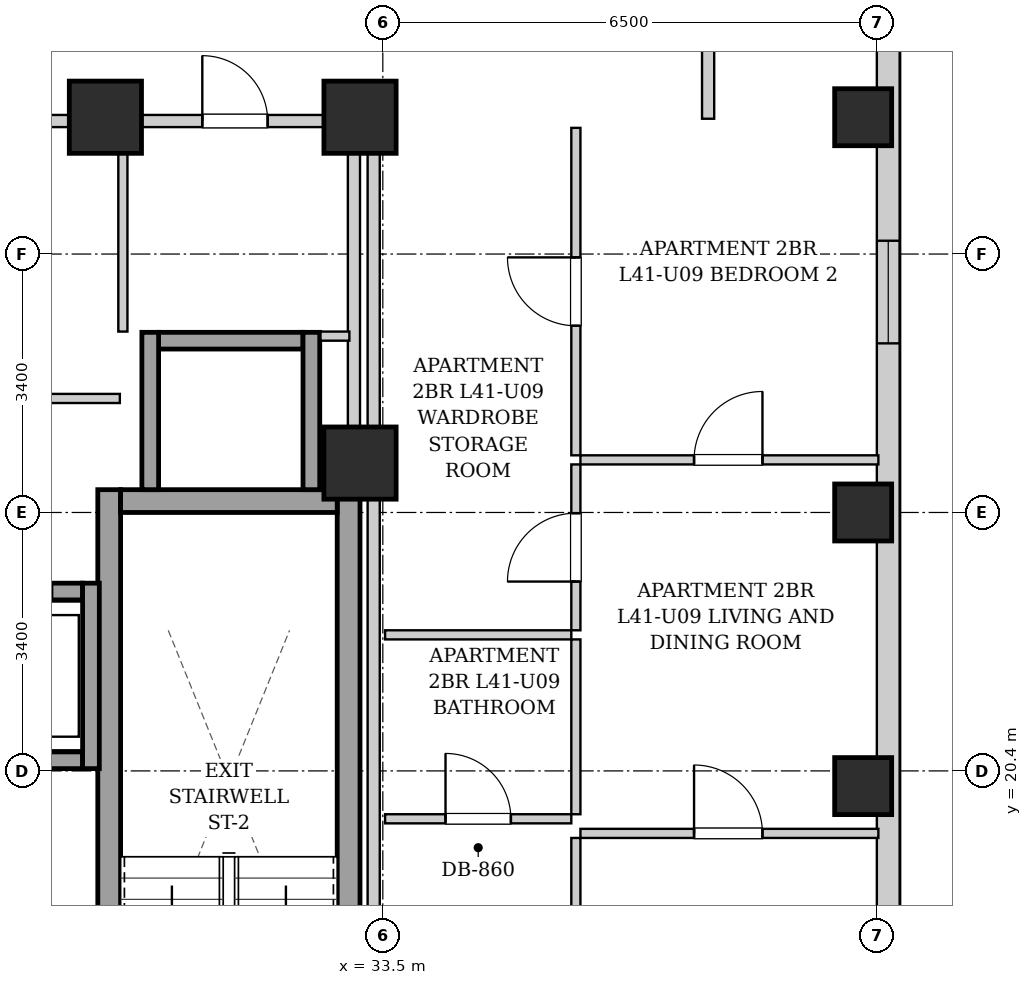
"""IFC4 building model, lengths in metres.
Left out: names, types, materials, properties, quantities, classifications, styles, units other than length and angle.
Written with IfcOpenShell. Run it as: python <this file> out.ifc"""

import sys

from ifc_helpers import new_model, si_unit, direction, frame, frame_2d, origin, origin_2d, place, context, subcontext, project, spatial, rectangle, extrude, element, fill, save


model = new_model("IFC4")
c1 = context("Model", 3, precision=1e-05, world=origin(), true_north=direction((0.0, 1.0)))
c2 = subcontext(c1, "Body", "Model", "MODEL_VIEW")
j1 = project(units=[si_unit("LENGTHUNIT", "METRE"), si_unit("PLANEANGLEUNIT", "RADIAN")], contexts=[c1])
p1 = place(None, origin())
s1 = spatial("IfcSite", under=j1, at=p1, CompositionType="ELEMENT")
p2 = place(p1, origin())
s2 = spatial("IfcBuilding", under=s1, at=p2, CompositionType="ELEMENT")
p3 = place(p2, frame((0.0, 0.0, 143.9)))
s3 = spatial("IfcBuildingStorey", under=s2, at=p3, CompositionType="ELEMENT", Elevation=143.9)
for number, where, z_axis, x_axis in (
    (1, (39.82, 20.2, 0.0), (0.0, 0.0, 1.0), (1.0, 0.0, 0.0)),
    (2, (39.82, 23.8, 0.0), (0.0, 0.0, 1.0), (1.0, 0.0, 0.0)),
    (3, (39.82, 29.0, 0.0), (0.0, 0.0, 1.0), (1.0, 0.0, 0.0)),
):
    element("IfcColumn", number, at=place(p3, frame(where, z_axis=z_axis, x_axis=x_axis)), inside=s3, PredefinedType="COLUMN", context=c2, shape_type="SweptSolid", body=[
        extrude(rectangle(XDim=0.75, YDim=0.75, at=origin_2d()), origin(), (0.0, 0.0, 1.0), 3.25),
    ])
for number, where, z_axis, x_axis in (
    (4, (29.85, 29.0, 0.0), (0.0, 0.0, 1.0), (1.0, 0.0, 0.0)),
    (5, (33.2, 29.0, 0.0), (0.0, 0.0, 1.0), (1.0, 0.0, 0.0)),
    (6, (33.2, 24.45, 0.0), (0.0, 0.0, 1.0), (1.0, 0.0, 0.0)),
):
    element("IfcColumn", number, at=place(p3, frame(where, z_axis=z_axis, x_axis=x_axis)), inside=s3, PredefinedType="COLUMN", context=c2, shape_type="SweptSolid", body=[
        extrude(rectangle(XDim=0.95, YDim=0.95, at=origin_2d()), origin(), (0.0, 0.0, 1.0), 3.25),
    ])
p4 = place(p3, frame((40.15, 40.8, 0.0), z_axis=(0.0, 0.0, 1.0), x_axis=(0.0, -1.0, 0.0)))
e7 = element("IfcWall", 7, at=p4, inside=s3, PredefinedType="SOLIDWALL", context=c2, shape_type="SweptSolid", body=[
    extrude(rectangle(XDim=34.5, YDim=0.3, at=frame_2d((17.25, 0.0))), origin(), (0.0, 0.0, 1.0), 2.99),
])
p5 = place(p4, frame((31.575, 0.0, 0.55)))
e8 = element("IfcOpeningElement", 8, at=p5, cuts=e7, PredefinedType="OPENING", context=c2, shape_type="SweptSolid", body=[
    extrude(rectangle(XDim=1.35, YDim=1.2, at=frame_2d((0.675, 0.6))), frame((0.0, 0.16, 0.0), z_axis=(0.0, -1.0, 0.0), x_axis=(1.0, 0.0, 0.0)), (0.0, 0.0, 1.0), 0.32),
])
p6 = place(p4, frame((3.075, 0.0, 0.55)))
e9 = element("IfcOpeningElement", 9, at=p6, cuts=e7, PredefinedType="OPENING", context=c2, shape_type="SweptSolid", body=[
    extrude(rectangle(XDim=1.35, YDim=1.2, at=frame_2d((0.675, 0.6))), frame((0.0, 0.16, 0.0), z_axis=(0.0, -1.0, 0.0), x_axis=(1.0, 0.0, 0.0)), (0.0, 0.0, 1.0), 0.32),
])
p7 = place(p4, frame((1.085, 0.0, 0.55)))
e10 = element("IfcOpeningElement", 10, at=p7, cuts=e7, PredefinedType="OPENING", context=c2, shape_type="SweptSolid", body=[
    extrude(rectangle(XDim=1.35, YDim=1.2, at=frame_2d((0.675, 0.6))), frame((0.0, 0.16, 0.0), z_axis=(0.0, -1.0, 0.0), x_axis=(1.0, 0.0, 0.0)), (0.0, 0.0, 1.0), 0.32),
])
p8 = place(p4, frame((22.8, 0.0, 0.55)))
e11 = element("IfcOpeningElement", 11, at=p8, cuts=e7, PredefinedType="OPENING", context=c2, shape_type="SweptSolid", body=[
    extrude(rectangle(XDim=1.35, YDim=1.2, at=frame_2d((0.675, 0.6))), frame((0.0, 0.16, 0.0), z_axis=(0.0, -1.0, 0.0), x_axis=(1.0, 0.0, 0.0)), (0.0, 0.0, 1.0), 0.32),
])
p9 = place(p4, frame((13.425, 0.0, 0.55)))
e12 = element("IfcOpeningElement", 12, at=p9, cuts=e7, PredefinedType="OPENING", context=c2, shape_type="SweptSolid", body=[
    extrude(rectangle(XDim=1.35, YDim=1.2, at=frame_2d((0.675, 0.6))), frame((0.0, 0.16, 0.0), z_axis=(0.0, -1.0, 0.0), x_axis=(1.0, 0.0, 0.0)), (0.0, 0.0, 1.0), 0.32),
])
for number, where, z_axis, x_axis in (
    (13, (29.9, 15.1, 0.0), (0.0, 0.0, 1.0), (0.0, 1.0, 0.0)),
    (14, (33.05, 15.1, 0.0), (0.0, 0.0, 1.0), (0.0, 1.0, 0.0)),
):
    element("IfcWall", number, at=place(p3, frame(where, z_axis=z_axis, x_axis=x_axis)), inside=s3, PredefinedType="SHEAR", context=c2, shape_type="SweptSolid", body=[
        extrude(rectangle(XDim=9.0, YDim=0.3, at=frame_2d((4.5, 0.0))), origin(), (0.0, 0.0, 1.0), 2.99),
    ])
p10 = place(p3, frame((30.05, 23.95, 0.0), z_axis=(0.0, 0.0, 1.0), x_axis=(1.0, 0.0, 0.0)))
e15 = element("IfcWall", 15, at=p10, inside=s3, PredefinedType="SHEAR", context=c2, shape_type="SweptSolid", body=[
    extrude(rectangle(XDim=2.85, YDim=0.3, at=frame_2d((1.425, 0.0))), origin(), (0.0, 0.0, 1.0), 2.99),
])
p11 = place(p3, frame((27.65, 20.54, 0.0), z_axis=(0.0, 0.0, 1.0), x_axis=(1.0, 0.0, 0.0)))
e16 = element("IfcWall", 16, at=p11, inside=s3, PredefinedType="SHEAR", context=c2, shape_type="SweptSolid", body=[
    extrude(rectangle(XDim=1.9, YDim=0.22, at=frame_2d((0.95, 0.0))), origin(), (0.0, 0.0, 1.0), 2.99),
])
p12 = place(p3, frame((27.65, 22.76, 0.0), z_axis=(0.0, 0.0, 1.0), x_axis=(1.0, 0.0, 0.0)))
e17 = element("IfcWall", 17, at=p12, inside=s3, PredefinedType="SHEAR", context=c2, shape_type="SweptSolid", body=[
    extrude(rectangle(XDim=1.9, YDim=0.22, at=frame_2d((0.95, 0.0))), origin(), (0.0, 0.0, 1.0), 2.99),
])
p13 = place(p12, frame((0.4, 0.0, 0.0)))
e18 = element("IfcOpeningElement", 18, at=p13, cuts=e17, PredefinedType="OPENING", context=c2, shape_type="SweptSolid", body=[
    extrude(rectangle(XDim=1.1, YDim=2.15, at=frame_2d((0.55, 1.075))), frame((0.0, 0.12, 0.0), z_axis=(0.0, -1.0, 0.0), x_axis=(1.0, 0.0, 0.0)), (0.0, 0.0, 1.0), 0.24),
])
p14 = place(p3, frame((29.66, 20.43, 0.0), z_axis=(0.0, 0.0, 1.0), x_axis=(0.0, 1.0, 0.0)))
e19 = element("IfcWall", 19, at=p14, inside=s3, PredefinedType="SHEAR", context=c2, shape_type="SweptSolid", body=[
    extrude(rectangle(XDim=2.44, YDim=0.22, at=frame_2d((1.22, 0.0))), origin(), (0.0, 0.0, 1.0), 2.99),
])
p15 = place(p3, frame((30.55, 26.06, 0.0), z_axis=(0.0, 0.0, 1.0), x_axis=(1.0, 0.0, 0.0)))
e20 = element("IfcWall", 20, at=p15, inside=s3, PredefinedType="SHEAR", context=c2, shape_type="SweptSolid", body=[
    extrude(rectangle(XDim=1.9, YDim=0.22, at=frame_2d((0.95, 0.0))), origin(), (0.0, 0.0, 1.0), 2.99),
])
for number, where, z_axis, x_axis in (
    (21, (30.44, 24.1, 0.0), (0.0, 0.0, 1.0), (0.0, 1.0, 0.0)),
    (22, (32.56, 24.1, 0.0), (0.0, 0.0, 1.0), (0.0, 1.0, 0.0)),
):
    element("IfcWall", number, at=place(p3, frame(where, z_axis=z_axis, x_axis=x_axis)), inside=s3, PredefinedType="SHEAR", context=c2, shape_type="SweptSolid", body=[
        extrude(rectangle(XDim=2.07, YDim=0.22, at=frame_2d((1.035, 0.0))), origin(), (0.0, 0.0, 1.0), 2.99),
    ])
p16 = place(p3, frame((33.12, 24.12, 0.0), z_axis=(0.0, 0.0, 1.0), x_axis=(0.0, 1.0, 0.0)))
e23 = element("IfcWall", 23, at=p16, inside=s3, PredefinedType="PARTITIONING", context=c2, shape_type="SweptSolid", body=[
    extrude(rectangle(XDim=4.76, YDim=0.16, at=frame_2d((2.38, 0.0))), origin(), (0.0, 0.0, 1.0), 2.99),
])
p17 = place(p3, frame((30.08, 26.18, 0.0), z_axis=(0.0, 0.0, 1.0), x_axis=(0.0, 1.0, 0.0)))
e24 = element("IfcWall", 24, at=p17, inside=s3, PredefinedType="PARTITIONING", context=c2, shape_type="SweptSolid", body=[
    extrude(rectangle(XDim=2.68, YDim=0.12, at=frame_2d((1.34, 0.0))), origin(), (0.0, 0.0, 1.0), 2.99),
])
p18 = place(p3, frame((32.68, 26.12, 0.0), z_axis=(0.0, 0.0, 1.0), x_axis=(1.0, 0.0, 0.0)))
e25 = element("IfcWall", 25, at=p18, inside=s3, PredefinedType="PARTITIONING", context=c2, shape_type="SweptSolid", body=[
    extrude(rectangle(XDim=0.38, YDim=0.12, at=frame_2d((0.19, 0.0))), origin(), (0.0, 0.0, 1.0), 2.99),
])
p19 = place(p3, frame((30.08, 28.95, 0.0), z_axis=(0.0, 0.0, 1.0), x_axis=(1.0, 0.0, 0.0)))
e26 = element("IfcWall", 26, at=p19, inside=s3, PredefinedType="PARTITIONING", context=c2, shape_type="SweptSolid", body=[
    extrude(rectangle(XDim=2.96, YDim=0.16, at=frame_2d((1.48, 0.0))), origin(), (0.0, 0.0, 1.0), 2.99),
])
p20 = place(p19, frame((1.045, 0.0, 0.0)))
e27 = element("IfcOpeningElement", 27, at=p20, cuts=e26, PredefinedType="OPENING", context=c2, shape_type="SweptSolid", body=[
    extrude(rectangle(XDim=0.86, YDim=2.05, at=frame_2d((0.43, 1.025))), frame((0.0, 0.09, 0.0), z_axis=(0.0, -1.0, 0.0), x_axis=(1.0, 0.0, 0.0)), (0.0, 0.0, 1.0), 0.18),
])
p21 = place(p3, frame((25.72, 28.95, 0.0), z_axis=(0.0, 0.0, 1.0), x_axis=(1.0, 0.0, 0.0)))
e28 = element("IfcWall", 28, at=p21, inside=s3, PredefinedType="PARTITIONING", context=c2, shape_type="SweptSolid", body=[
    extrude(rectangle(XDim=4.32, YDim=0.16, at=frame_2d((2.16, 0.0))), origin(), (0.0, 0.0, 1.0), 2.426),
])
p22 = place(p3, frame((25.72, 25.3, 0.0), z_axis=(0.0, 0.0, 1.0), x_axis=(1.0, 0.0, 0.0)))
e29 = element("IfcWall", 29, at=p22, inside=s3, PredefinedType="PARTITIONING", context=c2, shape_type="SweptSolid", body=[
    extrude(rectangle(XDim=4.32, YDim=0.12, at=frame_2d((2.16, 0.0))), origin(), (0.0, 0.0, 1.0), 2.99),
])
p23 = place(p22, frame((1.65, 0.0, 0.0)))
e30 = element("IfcOpeningElement", 30, at=p23, cuts=e29, PredefinedType="OPENING", context=c2, shape_type="SweptSolid", body=[
    extrude(rectangle(XDim=0.9, YDim=2.05, at=frame_2d((0.45, 1.025))), frame((0.0, 0.07, 0.0), z_axis=(0.0, -1.0, 0.0), x_axis=(1.0, 0.0, 0.0)), (0.0, 0.0, 1.0), 0.14),
])
p24 = place(p3, frame((37.78, 28.98, 0.0), z_axis=(0.0, 0.0, 1.0), x_axis=(0.0, 1.0, 0.0)))
e31 = element("IfcWall", 31, at=p24, inside=s3, PredefinedType="PARTITIONING", context=c2, shape_type="SweptSolid", body=[
    extrude(rectangle(XDim=1.74, YDim=0.16, at=frame_2d((0.87, 0.0))), origin(), (0.0, 0.0, 1.0), 2.99),
])
p25 = place(p3, frame((33.53, 22.19, 0.0), z_axis=(0.0, 0.0, 1.0), x_axis=(1.0, 0.0, 0.0)))
e32 = element("IfcWall", 32, at=p25, inside=s3, PredefinedType="PARTITIONING", context=c2, shape_type="SweptSolid", body=[
    extrude(rectangle(XDim=2.45, YDim=0.12, at=frame_2d((1.225, 0.0))), origin(), (0.0, 0.0, 1.0), 2.99),
])
p26 = place(p3, frame((36.04, 22.25, 0.0), z_axis=(0.0, 0.0, 1.0), x_axis=(0.0, 1.0, 0.0)))
e33 = element("IfcWall", 33, at=p26, inside=s3, PredefinedType="PARTITIONING", context=c2, shape_type="SweptSolid", body=[
    extrude(rectangle(XDim=2.182, YDim=0.12, at=frame_2d((1.091, 0.0))), origin(), (0.0, 0.0, 1.0), 2.99),
])
p27 = place(p26, frame((0.641, 0.0, 0.0)))
e34 = element("IfcOpeningElement", 34, at=p27, cuts=e33, PredefinedType="OPENING", context=c2, shape_type="SweptSolid", body=[
    extrude(rectangle(XDim=0.9, YDim=2.05, at=frame_2d((0.45, 1.025))), frame((0.0, 0.07, 0.0), z_axis=(0.0, -1.0, 0.0), x_axis=(1.0, 0.0, 0.0)), (0.0, 0.0, 1.0), 0.14),
])
p28 = place(p3, frame((36.04, 24.552, 0.0), z_axis=(0.0, 0.0, 1.0), x_axis=(0.0, 1.0, 0.0)))
e35 = element("IfcWall", 35, at=p28, inside=s3, PredefinedType="PARTITIONING", context=c2, shape_type="SweptSolid", body=[
    extrude(rectangle(XDim=4.308, YDim=0.12, at=frame_2d((2.154, 0.0))), origin(), (0.0, 0.0, 1.0), 2.99),
])
p29 = place(p28, frame((1.704, 0.0, 0.0)))
e36 = element("IfcOpeningElement", 36, at=p29, cuts=e35, PredefinedType="OPENING", context=c2, shape_type="SweptSolid", body=[
    extrude(rectangle(XDim=0.9, YDim=2.05, at=frame_2d((0.45, 1.025))), frame((0.0, 0.07, 0.0), z_axis=(0.0, -1.0, 0.0), x_axis=(1.0, 0.0, 0.0)), (0.0, 0.0, 1.0), 0.14),
])
p30 = place(p3, frame((33.53, 19.77, 0.0), z_axis=(0.0, 0.0, 1.0), x_axis=(1.0, 0.0, 0.0)))
e37 = element("IfcWall", 37, at=p30, inside=s3, PredefinedType="PARTITIONING", context=c2, shape_type="SweptSolid", body=[
    extrude(rectangle(XDim=2.45, YDim=0.12, at=frame_2d((1.225, 0.0))), origin(), (0.0, 0.0, 1.0), 2.99),
])
p31 = place(p30, frame((0.795, 0.0, 0.0)))
e38 = element("IfcOpeningElement", 38, at=p31, cuts=e37, PredefinedType="OPENING", context=c2, shape_type="SweptSolid", body=[
    extrude(rectangle(XDim=0.86, YDim=2.05, at=frame_2d((0.43, 1.025))), frame((0.0, 0.07, 0.0), z_axis=(0.0, -1.0, 0.0), x_axis=(1.0, 0.0, 0.0)), (0.0, 0.0, 1.0), 0.14),
])
p32 = place(p3, frame((36.04, 19.83, 0.0), z_axis=(0.0, 0.0, 1.0), x_axis=(0.0, 1.0, 0.0)))
e39 = element("IfcWall", 39, at=p32, inside=s3, PredefinedType="PARTITIONING", context=c2, shape_type="SweptSolid", body=[
    extrude(rectangle(XDim=2.3, YDim=0.12, at=frame_2d((1.15, 0.0))), origin(), (0.0, 0.0, 1.0), 2.99),
])
p33 = place(p3, frame((36.04, 15.21, 0.0), z_axis=(0.0, 0.0, 1.0), x_axis=(0.0, 1.0, 0.0)))
e40 = element("IfcWall", 40, at=p33, inside=s3, PredefinedType="PARTITIONING", context=c2, shape_type="SweptSolid", body=[
    extrude(rectangle(XDim=4.308, YDim=0.12, at=frame_2d((2.154, 0.0))), origin(), (0.0, 0.0, 1.0), 2.99),
])
p34 = place(p33, frame((1.704, 0.0, 0.0)))
e41 = element("IfcOpeningElement", 41, at=p34, cuts=e40, PredefinedType="OPENING", context=c2, shape_type="SweptSolid", body=[
    extrude(rectangle(XDim=0.9, YDim=2.05, at=frame_2d((0.45, 1.025))), frame((0.0, 0.07, 0.0), z_axis=(0.0, -1.0, 0.0), x_axis=(1.0, 0.0, 0.0)), (0.0, 0.0, 1.0), 0.14),
])
p35 = place(p3, frame((36.1, 19.578, 0.0), z_axis=(0.0, 0.0, 1.0), x_axis=(1.0, 0.0, 0.0)))
e42 = element("IfcWall", 42, at=p35, inside=s3, PredefinedType="PARTITIONING", context=c2, shape_type="SweptSolid", body=[
    extrude(rectangle(XDim=3.92, YDim=0.12, at=frame_2d((1.96, 0.0))), origin(), (0.0, 0.0, 1.0), 2.99),
])
p36 = place(p35, frame((1.495, 0.0, 0.0)))
e43 = element("IfcOpeningElement", 43, at=p36, cuts=e42, PredefinedType="OPENING", context=c2, shape_type="SweptSolid", body=[
    extrude(rectangle(XDim=0.9, YDim=2.05, at=frame_2d((0.45, 1.025))), frame((0.0, 0.07, 0.0), z_axis=(0.0, -1.0, 0.0), x_axis=(1.0, 0.0, 0.0)), (0.0, 0.0, 1.0), 0.14),
])
p37 = place(p3, frame((36.1, 24.492, 0.0), z_axis=(0.0, 0.0, 1.0), x_axis=(1.0, 0.0, 0.0)))
e44 = element("IfcWall", 44, at=p37, inside=s3, PredefinedType="PARTITIONING", context=c2, shape_type="SweptSolid", body=[
    extrude(rectangle(XDim=3.92, YDim=0.12, at=frame_2d((1.96, 0.0))), origin(), (0.0, 0.0, 1.0), 2.621),
])
p38 = place(p37, frame((1.495, 0.0, 0.0)))
e45 = element("IfcOpeningElement", 45, at=p38, cuts=e44, PredefinedType="OPENING", context=c2, shape_type="SweptSolid", body=[
    extrude(rectangle(XDim=0.9, YDim=2.05, at=frame_2d((0.45, 1.025))), frame((0.0, 0.07, 0.0), z_axis=(0.0, -1.0, 0.0), x_axis=(1.0, 0.0, 0.0)), (0.0, 0.0, 1.0), 0.14),
])
p39 = place(p3, frame((33.38, 15.02, 0.0), z_axis=(0.0, 0.0, 1.0), x_axis=(0.0, 1.0, 0.0)))
e46 = element("IfcWall", 46, at=p39, inside=s3, PredefinedType="PARTITIONING", context=c2, shape_type="SweptSolid", body=[
    extrude(rectangle(XDim=13.98, YDim=0.16, at=frame_2d((6.99, 0.0))), origin(), (0.0, 0.0, 1.0), 2.99),
])
p40 = place(p20, origin())
e47 = element("IfcDoor", 47, at=p40, inside=s3, OperationType="SINGLE_SWING_LEFT", PredefinedType="DOOR", context=c2, shape_type="SweptSolid", body=[
    extrude(rectangle(XDim=0.86, YDim=2.05, at=frame_2d((0.43, 1.025))), frame((0.0, 0.025, 0.0), z_axis=(0.0, -1.0, 0.0), x_axis=(1.0, 0.0, 0.0)), (0.0, 0.0, 1.0), 0.05),
])
fill(e27, e47)
p41 = place(p27, origin())
e48 = element("IfcDoor", 48, at=p41, inside=s3, OperationType="SINGLE_SWING_LEFT", PredefinedType="DOOR", context=c2, shape_type="SweptSolid", body=[
    extrude(rectangle(XDim=0.9, YDim=2.05, at=frame_2d((0.45, 1.025))), frame((0.0, 0.025, 0.0), z_axis=(0.0, -1.0, 0.0), x_axis=(1.0, 0.0, 0.0)), (0.0, 0.0, 1.0), 0.05),
])
fill(e34, e48)
p42 = place(p29, origin())
e49 = element("IfcDoor", 49, at=p42, inside=s3, OperationType="SINGLE_SWING_RIGHT", PredefinedType="DOOR", context=c2, shape_type="SweptSolid", body=[
    extrude(rectangle(XDim=0.9, YDim=2.05, at=frame_2d((0.45, 1.025))), frame((0.0, 0.025, 0.0), z_axis=(0.0, -1.0, 0.0), x_axis=(1.0, 0.0, 0.0)), (0.0, 0.0, 1.0), 0.05),
])
fill(e36, e49)
p43 = place(p31, origin())
e50 = element("IfcDoor", 50, at=p43, inside=s3, OperationType="SINGLE_SWING_LEFT", PredefinedType="DOOR", context=c2, shape_type="SweptSolid", body=[
    extrude(rectangle(XDim=0.86, YDim=2.05, at=frame_2d((0.43, 1.025))), frame((0.0, 0.025, 0.0), z_axis=(0.0, -1.0, 0.0), x_axis=(1.0, 0.0, 0.0)), (0.0, 0.0, 1.0), 0.05),
])
fill(e38, e50)
p44 = place(p36, origin())
e51 = element("IfcDoor", 51, at=p44, inside=s3, OperationType="SINGLE_SWING_LEFT", PredefinedType="DOOR", context=c2, shape_type="SweptSolid", body=[
    extrude(rectangle(XDim=0.9, YDim=2.05, at=frame_2d((0.45, 1.025))), frame((0.0, 0.025, 0.0), z_axis=(0.0, -1.0, 0.0), x_axis=(1.0, 0.0, 0.0)), (0.0, 0.0, 1.0), 0.05),
])
fill(e43, e51)
p45 = place(p38, origin())
e52 = element("IfcDoor", 52, at=p45, inside=s3, OperationType="SINGLE_SWING_RIGHT", PredefinedType="DOOR", context=c2, shape_type="SweptSolid", body=[
    extrude(rectangle(XDim=0.9, YDim=2.05, at=frame_2d((0.45, 1.025))), frame((0.0, 0.025, 0.0), z_axis=(0.0, -1.0, 0.0), x_axis=(1.0, 0.0, 0.0)), (0.0, 0.0, 1.0), 0.05),
])
fill(e45, e52)
p46 = place(p9, origin())
e53 = element("IfcWindow", 53, at=p46, inside=s3, PartitioningType="SINGLE_PANEL", PredefinedType="WINDOW", context=c2, shape_type="SweptSolid", body=[
    extrude(rectangle(XDim=1.35, YDim=1.2, at=frame_2d((0.675, 0.6))), frame((0.0, 0.03, 0.0), z_axis=(0.0, -1.0, 0.0), x_axis=(1.0, 0.0, 0.0)), (0.0, 0.0, 1.0), 0.06),
])
fill(e12, e53)
save(model, sys.argv[1])
